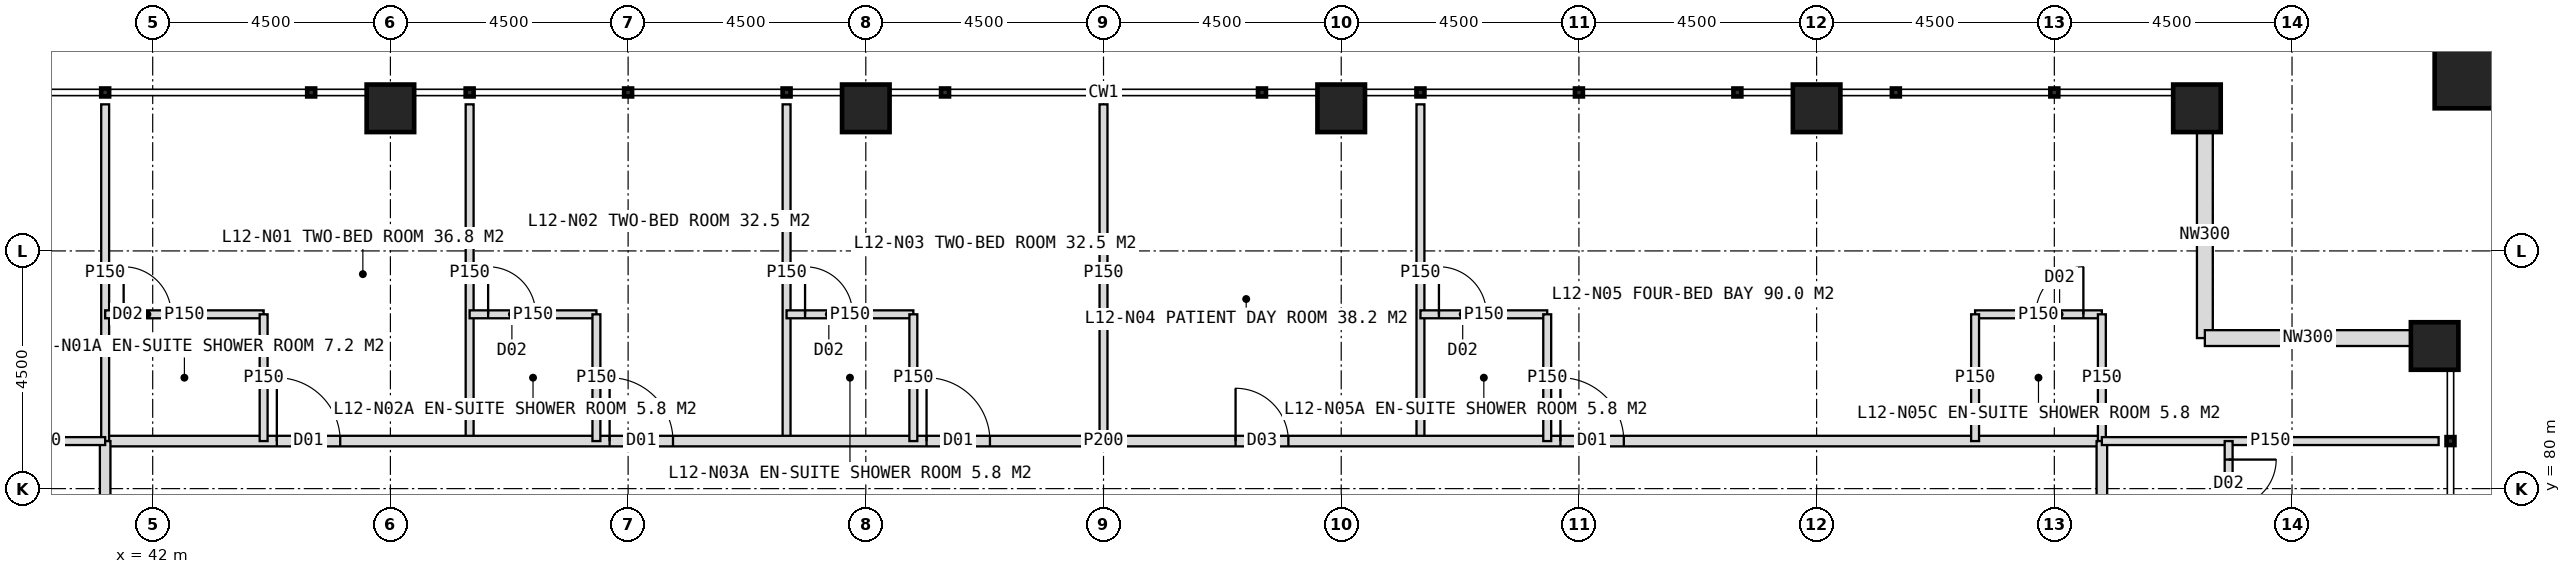
"""IFC4 building model, lengths in metres.
Left out: names, types, materials, properties, quantities, classifications, styles, units other than length and angle.
Written with IfcOpenShell. Run it as: python <this file> out.ifc"""

import sys

from ifc_helpers import new_model, si_unit, direction, frame, frame_2d, origin, origin_2d, place, context, subcontext, project, spatial, rectangle, hollow_rectangle, extrude, element, fill, save


model = new_model("IFC4")
c1 = context("Model", 3, precision=1e-05, world=origin(), true_north=direction((0.0, 1.0)))
c2 = subcontext(c1, "Body", "Model", "MODEL_VIEW")
j1 = project(units=[si_unit("LENGTHUNIT", "METRE"), si_unit("PLANEANGLEUNIT", "RADIAN")], contexts=[c1])
p1 = place(None, origin())
s1 = spatial("IfcSite", under=j1, at=p1, CompositionType="ELEMENT")
p2 = place(p1, origin())
s2 = spatial("IfcBuilding", under=s1, at=p2, CompositionType="ELEMENT")
p3 = place(p2, frame((0.0, 0.0, 55.0)))
s3 = spatial("IfcBuildingStorey", under=s2, at=p3, CompositionType="ELEMENT", Elevation=55.0)
for number, where, z_axis, x_axis in (
    (1, (46.5, 87.2, 0.0), (0.0, 0.0, 1.0), (1.0, 0.0, 0.0)),
    (2, (55.5, 87.2, 0.0), (0.0, 0.0, 1.0), (1.0, 0.0, 0.0)),
    (3, (64.5, 87.2, 0.0), (0.0, 0.0, 1.0), (1.0, 0.0, 0.0)),
    (4, (73.5, 87.2, 0.0), (0.0, 0.0, 1.0), (1.0, 0.0, 0.0)),
    (5, (80.7, 87.2, 0.0), (0.0, 0.0, 1.0), (1.0, 0.0, 0.0)),
    (6, (85.2, 82.7, 0.0), (0.0, 0.0, 1.0), (1.0, 0.0, 0.0)),
):
    element("IfcColumn", number, at=place(p3, frame(where, z_axis=z_axis, x_axis=x_axis)), inside=s3, PredefinedType="COLUMN", context=c2, shape_type="SweptSolid", body=[
        extrude(hollow_rectangle(XDim=0.9, YDim=0.9, WallThickness=0.08, at=origin_2d()), origin(), (0.0, 0.0, 1.0), 4.0),
    ])
p4 = place(p3, frame((86.1, 88.1, 0.0), z_axis=(0.0, 0.0, 1.0), x_axis=(1.0, 0.0, 0.0)))
e7 = element("IfcColumn", 7, at=p4, inside=s3, PredefinedType="COLUMN", context=c2, shape_type="SweptSolid", body=[
    extrude(hollow_rectangle(XDim=1.8, YDim=1.8, WallThickness=0.1, at=origin_2d()), origin(), (0.0, 0.0, 1.0), 4.0),
])
for number, where, z_axis, x_axis in (
    (8, (80.85, 86.75, 0.0), (0.0, 0.0, 1.0), (0.0, -1.0, 0.0)),
    (9, (80.85, 82.85, 0.0), (0.0, 0.0, 1.0), (1.0, 0.0, 0.0)),
):
    element("IfcWall", number, at=place(p3, frame(where, z_axis=z_axis, x_axis=x_axis)), inside=s3, PredefinedType="ELEMENTEDWALL", context=c2, shape_type="SweptSolid", body=[
        extrude(rectangle(XDim=3.9, YDim=0.3, at=frame_2d((1.95, 0.0))), origin(), (0.0, 0.0, 1.0), 2.95),
    ])
for number, where, z_axis, x_axis in (
    (10, (48.0, 80.9, 0.0), (0.0, 0.0, 1.0), (0.0, 1.0, 0.0)),
    (11, (54.0, 80.9, 0.0), (0.0, 0.0, 1.0), (0.0, 1.0, 0.0)),
):
    element("IfcWall", number, at=place(p3, frame(where, z_axis=z_axis, x_axis=x_axis)), inside=s3, PredefinedType="PARTITIONING", context=c2, shape_type="SweptSolid", body=[
        extrude(rectangle(XDim=6.375, YDim=0.15, at=frame_2d((3.188, 0.0))), origin(), (0.0, 0.0, 1.0), 3.75),
    ])
p5 = place(p3, frame((60.0, 80.9, 0.0), z_axis=(0.0, 0.0, 1.0), x_axis=(0.0, 1.0, 0.0)))
e12 = element("IfcWall", 12, at=p5, inside=s3, PredefinedType="PARTITIONING", context=c2, shape_type="SweptSolid", body=[
    extrude(rectangle(XDim=6.375, YDim=0.15, at=frame_2d((3.188, 0.0))), origin(), (0.0, 0.0, 1.0), 2.75),
])
p6 = place(p3, frame((66.0, 80.9, 0.0), z_axis=(0.0, 0.0, 1.0), x_axis=(0.0, 1.0, 0.0)))
e13 = element("IfcWall", 13, at=p6, inside=s3, PredefinedType="PARTITIONING", context=c2, shape_type="SweptSolid", body=[
    extrude(rectangle(XDim=6.375, YDim=0.15, at=frame_2d((3.188, 0.0))), origin(), (0.0, 0.0, 1.0), 3.75),
])
p7 = place(p3, frame((41.1, 80.9, 0.0), z_axis=(0.0, 0.0, 1.0), x_axis=(1.0, 0.0, 0.0)))
e14 = element("IfcWall", 14, at=p7, inside=s3, PredefinedType="PARTITIONING", context=c2, shape_type="SweptSolid", body=[
    extrude(rectangle(XDim=37.8, YDim=0.2, at=frame_2d((18.9, 0.0))), origin(), (0.0, 0.0, 1.0), 3.75),
])
p8 = place(p7, frame((3.25, 0.0, 0.0)))
e15 = element("IfcOpeningElement", 15, at=p8, cuts=e14, PredefinedType="OPENING", context=c2, shape_type="SweptSolid", body=[
    extrude(rectangle(XDim=1.2, YDim=2.2, at=frame_2d((0.6, 1.1))), frame((0.0, 0.11, 0.0), z_axis=(0.0, -1.0, 0.0), x_axis=(1.0, 0.0, 0.0)), (0.0, 0.0, 1.0), 0.22),
])
p9 = place(p7, frame((9.55, 0.0, 0.0)))
e16 = element("IfcOpeningElement", 16, at=p9, cuts=e14, PredefinedType="OPENING", context=c2, shape_type="SweptSolid", body=[
    extrude(rectangle(XDim=1.2, YDim=2.2, at=frame_2d((0.6, 1.1))), frame((0.0, 0.11, 0.0), z_axis=(0.0, -1.0, 0.0), x_axis=(1.0, 0.0, 0.0)), (0.0, 0.0, 1.0), 0.22),
])
p10 = place(p7, frame((15.55, 0.0, 0.0)))
e17 = element("IfcOpeningElement", 17, at=p10, cuts=e14, PredefinedType="OPENING", context=c2, shape_type="SweptSolid", body=[
    extrude(rectangle(XDim=1.2, YDim=2.2, at=frame_2d((0.6, 1.1))), frame((0.0, 0.11, 0.0), z_axis=(0.0, -1.0, 0.0), x_axis=(1.0, 0.0, 0.0)), (0.0, 0.0, 1.0), 0.22),
])
p11 = place(p7, frame((21.4, 0.0, 0.0)))
e18 = element("IfcOpeningElement", 18, at=p11, cuts=e14, PredefinedType="OPENING", context=c2, shape_type="SweptSolid", body=[
    extrude(rectangle(XDim=1.0, YDim=2.1, at=frame_2d((0.5, 1.05))), frame((0.0, 0.11, 0.0), z_axis=(0.0, -1.0, 0.0), x_axis=(1.0, 0.0, 0.0)), (0.0, 0.0, 1.0), 0.22),
])
p12 = place(p7, frame((27.55, 0.0, 0.0)))
e19 = element("IfcOpeningElement", 19, at=p12, cuts=e14, PredefinedType="OPENING", context=c2, shape_type="SweptSolid", body=[
    extrude(rectangle(XDim=1.2, YDim=2.2, at=frame_2d((0.6, 1.1))), frame((0.0, 0.11, 0.0), z_axis=(0.0, -1.0, 0.0), x_axis=(1.0, 0.0, 0.0)), (0.0, 0.0, 1.0), 0.22),
])
p13 = place(p3, frame((41.1, 80.9, 0.0), z_axis=(0.0, 0.0, 1.0), x_axis=(0.0, 1.0, 0.0)))
e20 = element("IfcWall", 20, at=p13, inside=s3, PredefinedType="PARTITIONING", context=c2, shape_type="SweptSolid", body=[
    extrude(rectangle(XDim=6.375, YDim=0.15, at=frame_2d((3.188, 0.0))), origin(), (0.0, 0.0, 1.0), 3.75),
])
p14 = place(p3, frame((41.1, 83.3, 0.0), z_axis=(0.0, 0.0, 1.0), x_axis=(1.0, 0.0, 0.0)))
e21 = element("IfcWall", 21, at=p14, inside=s3, PredefinedType="PARTITIONING", context=c2, shape_type="SweptSolid", body=[
    extrude(rectangle(XDim=3.0, YDim=0.15, at=frame_2d((1.5, 0.0))), origin(), (0.0, 0.0, 1.0), 3.75),
])
p15 = place(p14, frame((0.35, 0.0, 0.0)))
e22 = element("IfcOpeningElement", 22, at=p15, cuts=e21, PredefinedType="OPENING", context=c2, shape_type="SweptSolid", body=[
    extrude(rectangle(XDim=0.9, YDim=2.1, at=frame_2d((0.45, 1.05))), frame((0.0, 0.085, 0.0), z_axis=(0.0, -1.0, 0.0), x_axis=(1.0, 0.0, 0.0)), (0.0, 0.0, 1.0), 0.17),
])
p16 = place(p3, frame((44.1, 80.9, 0.0), z_axis=(0.0, 0.0, 1.0), x_axis=(0.0, 1.0, 0.0)))
e23 = element("IfcWall", 23, at=p16, inside=s3, PredefinedType="PARTITIONING", context=c2, shape_type="SweptSolid", body=[
    extrude(rectangle(XDim=2.4, YDim=0.15, at=frame_2d((1.2, 0.0))), origin(), (0.0, 0.0, 1.0), 3.75),
])
p17 = place(p3, frame((48.0, 83.3, 0.0), z_axis=(0.0, 0.0, 1.0), x_axis=(1.0, 0.0, 0.0)))
e24 = element("IfcWall", 24, at=p17, inside=s3, PredefinedType="PARTITIONING", context=c2, shape_type="SweptSolid", body=[
    extrude(rectangle(XDim=2.4, YDim=0.15, at=frame_2d((1.2, 0.0))), origin(), (0.0, 0.0, 1.0), 3.75),
])
p18 = place(p17, frame((0.35, 0.0, 0.0)))
e25 = element("IfcOpeningElement", 25, at=p18, cuts=e24, PredefinedType="OPENING", context=c2, shape_type="SweptSolid", body=[
    extrude(rectangle(XDim=0.9, YDim=2.1, at=frame_2d((0.45, 1.05))), frame((0.0, 0.085, 0.0), z_axis=(0.0, -1.0, 0.0), x_axis=(1.0, 0.0, 0.0)), (0.0, 0.0, 1.0), 0.17),
])
p19 = place(p3, frame((50.4, 80.9, 0.0), z_axis=(0.0, 0.0, 1.0), x_axis=(0.0, 1.0, 0.0)))
e26 = element("IfcWall", 26, at=p19, inside=s3, PredefinedType="PARTITIONING", context=c2, shape_type="SweptSolid", body=[
    extrude(rectangle(XDim=2.4, YDim=0.15, at=frame_2d((1.2, 0.0))), origin(), (0.0, 0.0, 1.0), 3.75),
])
p20 = place(p3, frame((54.0, 83.3, 0.0), z_axis=(0.0, 0.0, 1.0), x_axis=(1.0, 0.0, 0.0)))
e27 = element("IfcWall", 27, at=p20, inside=s3, PredefinedType="PARTITIONING", context=c2, shape_type="SweptSolid", body=[
    extrude(rectangle(XDim=2.4, YDim=0.15, at=frame_2d((1.2, 0.0))), origin(), (0.0, 0.0, 1.0), 3.75),
])
p21 = place(p20, frame((0.35, 0.0, 0.0)))
e28 = element("IfcOpeningElement", 28, at=p21, cuts=e27, PredefinedType="OPENING", context=c2, shape_type="SweptSolid", body=[
    extrude(rectangle(XDim=0.9, YDim=2.1, at=frame_2d((0.45, 1.05))), frame((0.0, 0.085, 0.0), z_axis=(0.0, -1.0, 0.0), x_axis=(1.0, 0.0, 0.0)), (0.0, 0.0, 1.0), 0.17),
])
p22 = place(p3, frame((56.4, 80.9, 0.0), z_axis=(0.0, 0.0, 1.0), x_axis=(0.0, 1.0, 0.0)))
e29 = element("IfcWall", 29, at=p22, inside=s3, PredefinedType="PARTITIONING", context=c2, shape_type="SweptSolid", body=[
    extrude(rectangle(XDim=2.4, YDim=0.15, at=frame_2d((1.2, 0.0))), origin(), (0.0, 0.0, 1.0), 3.75),
])
p23 = place(p3, frame((66.0, 83.3, 0.0), z_axis=(0.0, 0.0, 1.0), x_axis=(1.0, 0.0, 0.0)))
e30 = element("IfcWall", 30, at=p23, inside=s3, PredefinedType="PARTITIONING", context=c2, shape_type="SweptSolid", body=[
    extrude(rectangle(XDim=2.4, YDim=0.15, at=frame_2d((1.2, 0.0))), origin(), (0.0, 0.0, 1.0), 3.75),
])
p24 = place(p23, frame((0.35, 0.0, 0.0)))
e31 = element("IfcOpeningElement", 31, at=p24, cuts=e30, PredefinedType="OPENING", context=c2, shape_type="SweptSolid", body=[
    extrude(rectangle(XDim=0.9, YDim=2.1, at=frame_2d((0.45, 1.05))), frame((0.0, 0.085, 0.0), z_axis=(0.0, -1.0, 0.0), x_axis=(1.0, 0.0, 0.0)), (0.0, 0.0, 1.0), 0.17),
])
p25 = place(p3, frame((68.4, 80.9, 0.0), z_axis=(0.0, 0.0, 1.0), x_axis=(0.0, 1.0, 0.0)))
e32 = element("IfcWall", 32, at=p25, inside=s3, PredefinedType="PARTITIONING", context=c2, shape_type="SweptSolid", body=[
    extrude(rectangle(XDim=2.4, YDim=0.15, at=frame_2d((1.2, 0.0))), origin(), (0.0, 0.0, 1.0), 3.75),
])
p26 = place(p3, frame((76.5, 83.3, 0.0), z_axis=(0.0, 0.0, 1.0), x_axis=(1.0, 0.0, 0.0)))
e33 = element("IfcWall", 33, at=p26, inside=s3, PredefinedType="PARTITIONING", context=c2, shape_type="SweptSolid", body=[
    extrude(rectangle(XDim=2.4, YDim=0.15, at=frame_2d((1.2, 0.0))), origin(), (0.0, 0.0, 1.0), 3.75),
])
p27 = place(p26, frame((1.15, 0.0, 0.0)))
e34 = element("IfcOpeningElement", 34, at=p27, cuts=e33, PredefinedType="OPENING", context=c2, shape_type="SweptSolid", body=[
    extrude(rectangle(XDim=0.9, YDim=2.1, at=frame_2d((0.45, 1.05))), frame((0.0, 0.085, 0.0), z_axis=(0.0, -1.0, 0.0), x_axis=(1.0, 0.0, 0.0)), (0.0, 0.0, 1.0), 0.17),
])
for number, where, z_axis, x_axis in (
    (35, (76.5, 80.9, 0.0), (0.0, 0.0, 1.0), (0.0, 1.0, 0.0)),
    (36, (78.9, 80.9, 0.0), (0.0, 0.0, 1.0), (0.0, 1.0, 0.0)),
):
    element("IfcWall", number, at=place(p3, frame(where, z_axis=z_axis, x_axis=x_axis)), inside=s3, PredefinedType="PARTITIONING", context=c2, shape_type="SweptSolid", body=[
        extrude(rectangle(XDim=2.4, YDim=0.15, at=frame_2d((1.2, 0.0))), origin(), (0.0, 0.0, 1.0), 3.75),
    ])
p28 = place(p3, frame((41.1, 43.1, 0.0), z_axis=(0.0, 0.0, 1.0), x_axis=(0.0, 1.0, 0.0)))
e37 = element("IfcWall", 37, at=p28, inside=s3, PredefinedType="PARTITIONING", context=c2, shape_type="SweptSolid", body=[
    extrude(rectangle(XDim=37.8, YDim=0.2, at=frame_2d((18.9, 0.0))), origin(), (0.0, 0.0, 1.0), 3.75),
])
p29 = place(p28, frame((3.25, 0.0, 0.0)))
e38 = element("IfcOpeningElement", 38, at=p29, cuts=e37, PredefinedType="OPENING", context=c2, shape_type="SweptSolid", body=[
    extrude(rectangle(XDim=1.2, YDim=2.2, at=frame_2d((0.6, 1.1))), frame((0.0, 0.11, 0.0), z_axis=(0.0, -1.0, 0.0), x_axis=(1.0, 0.0, 0.0)), (0.0, 0.0, 1.0), 0.22),
])
p30 = place(p28, frame((9.55, 0.0, 0.0)))
e39 = element("IfcOpeningElement", 39, at=p30, cuts=e37, PredefinedType="OPENING", context=c2, shape_type="SweptSolid", body=[
    extrude(rectangle(XDim=1.2, YDim=2.2, at=frame_2d((0.6, 1.1))), frame((0.0, 0.11, 0.0), z_axis=(0.0, -1.0, 0.0), x_axis=(1.0, 0.0, 0.0)), (0.0, 0.0, 1.0), 0.22),
])
p31 = place(p28, frame((15.55, 0.0, 0.0)))
e40 = element("IfcOpeningElement", 40, at=p31, cuts=e37, PredefinedType="OPENING", context=c2, shape_type="SweptSolid", body=[
    extrude(rectangle(XDim=1.2, YDim=2.2, at=frame_2d((0.6, 1.1))), frame((0.0, 0.11, 0.0), z_axis=(0.0, -1.0, 0.0), x_axis=(1.0, 0.0, 0.0)), (0.0, 0.0, 1.0), 0.22),
])
p32 = place(p28, frame((21.55, 0.0, 0.0)))
e41 = element("IfcOpeningElement", 41, at=p32, cuts=e37, PredefinedType="OPENING", context=c2, shape_type="SweptSolid", body=[
    extrude(rectangle(XDim=1.2, YDim=2.2, at=frame_2d((0.6, 1.1))), frame((0.0, 0.11, 0.0), z_axis=(0.0, -1.0, 0.0), x_axis=(1.0, 0.0, 0.0)), (0.0, 0.0, 1.0), 0.22),
])
p33 = place(p28, frame((27.55, 0.0, 0.0)))
e42 = element("IfcOpeningElement", 42, at=p33, cuts=e37, PredefinedType="OPENING", context=c2, shape_type="SweptSolid", body=[
    extrude(rectangle(XDim=1.2, YDim=2.2, at=frame_2d((0.6, 1.1))), frame((0.0, 0.11, 0.0), z_axis=(0.0, -1.0, 0.0), x_axis=(1.0, 0.0, 0.0)), (0.0, 0.0, 1.0), 0.22),
])
p34 = place(p3, frame((41.1, 80.9, 0.0), z_axis=(0.0, 0.0, 1.0), x_axis=(-1.0, 0.0, 0.0)))
e43 = element("IfcWall", 43, at=p34, inside=s3, PredefinedType="PARTITIONING", context=c2, shape_type="SweptSolid", body=[
    extrude(rectangle(XDim=2.4, YDim=0.15, at=frame_2d((1.2, 0.0))), origin(), (0.0, 0.0, 1.0), 3.75),
])
p35 = place(p3, frame((78.9, 80.9, 0.0), z_axis=(0.0, 0.0, 1.0), x_axis=(0.0, -1.0, 0.0)))
e44 = element("IfcWall", 44, at=p35, inside=s3, PredefinedType="PARTITIONING", context=c2, shape_type="SweptSolid", body=[
    extrude(rectangle(XDim=37.8, YDim=0.2, at=frame_2d((18.9, 0.0))), origin(), (0.0, 0.0, 1.0), 3.75),
])
p36 = place(p35, frame((3.25, 0.0, 0.0)))
e45 = element("IfcOpeningElement", 45, at=p36, cuts=e44, PredefinedType="OPENING", context=c2, shape_type="SweptSolid", body=[
    extrude(rectangle(XDim=1.2, YDim=2.2, at=frame_2d((0.6, 1.1))), frame((0.0, 0.11, 0.0), z_axis=(0.0, -1.0, 0.0), x_axis=(1.0, 0.0, 0.0)), (0.0, 0.0, 1.0), 0.22),
])
p37 = place(p35, frame((9.55, 0.0, 0.0)))
e46 = element("IfcOpeningElement", 46, at=p37, cuts=e44, PredefinedType="OPENING", context=c2, shape_type="SweptSolid", body=[
    extrude(rectangle(XDim=1.2, YDim=2.2, at=frame_2d((0.6, 1.1))), frame((0.0, 0.11, 0.0), z_axis=(0.0, -1.0, 0.0), x_axis=(1.0, 0.0, 0.0)), (0.0, 0.0, 1.0), 0.22),
])
p38 = place(p35, frame((15.55, 0.0, 0.0)))
e47 = element("IfcOpeningElement", 47, at=p38, cuts=e44, PredefinedType="OPENING", context=c2, shape_type="SweptSolid", body=[
    extrude(rectangle(XDim=1.2, YDim=2.2, at=frame_2d((0.6, 1.1))), frame((0.0, 0.11, 0.0), z_axis=(0.0, -1.0, 0.0), x_axis=(1.0, 0.0, 0.0)), (0.0, 0.0, 1.0), 0.22),
])
p39 = place(p35, frame((21.55, 0.0, 0.0)))
e48 = element("IfcOpeningElement", 48, at=p39, cuts=e44, PredefinedType="OPENING", context=c2, shape_type="SweptSolid", body=[
    extrude(rectangle(XDim=1.2, YDim=2.2, at=frame_2d((0.6, 1.1))), frame((0.0, 0.11, 0.0), z_axis=(0.0, -1.0, 0.0), x_axis=(1.0, 0.0, 0.0)), (0.0, 0.0, 1.0), 0.22),
])
p40 = place(p35, frame((30.55, 0.0, 0.0)))
e49 = element("IfcOpeningElement", 49, at=p40, cuts=e44, PredefinedType="OPENING", context=c2, shape_type="SweptSolid", body=[
    extrude(rectangle(XDim=1.2, YDim=2.2, at=frame_2d((0.6, 1.1))), frame((0.0, 0.11, 0.0), z_axis=(0.0, -1.0, 0.0), x_axis=(1.0, 0.0, 0.0)), (0.0, 0.0, 1.0), 0.22),
])
p41 = place(p3, frame((78.9, 80.9, 0.0), z_axis=(0.0, 0.0, 1.0), x_axis=(1.0, 0.0, 0.0)))
e50 = element("IfcWall", 50, at=p41, inside=s3, PredefinedType="PARTITIONING", context=c2, shape_type="SweptSolid", body=[
    extrude(rectangle(XDim=6.375, YDim=0.15, at=frame_2d((3.188, 0.0))), origin(), (0.0, 0.0, 1.0), 3.75),
])
p42 = place(p3, frame((81.3, 80.9, 0.0), z_axis=(0.0, 0.0, 1.0), x_axis=(0.0, -1.0, 0.0)))
e51 = element("IfcWall", 51, at=p42, inside=s3, PredefinedType="PARTITIONING", context=c2, shape_type="SweptSolid", body=[
    extrude(rectangle(XDim=3.0, YDim=0.15, at=frame_2d((1.5, 0.0))), origin(), (0.0, 0.0, 1.0), 3.75),
])
p43 = place(p42, frame((0.35, 0.0, 0.0)))
e52 = element("IfcOpeningElement", 52, at=p43, cuts=e51, PredefinedType="OPENING", context=c2, shape_type="SweptSolid", body=[
    extrude(rectangle(XDim=0.9, YDim=2.1, at=frame_2d((0.45, 1.05))), frame((0.0, 0.085, 0.0), z_axis=(0.0, -1.0, 0.0), x_axis=(1.0, 0.0, 0.0)), (0.0, 0.0, 1.0), 0.17),
])
p44 = place(p8, origin())
e53 = element("IfcDoor", 53, at=p44, inside=s3, OperationType="SINGLE_SWING_LEFT", PredefinedType="DOOR", context=c2, shape_type="SweptSolid", body=[
    extrude(rectangle(XDim=1.2, YDim=2.2, at=frame_2d((0.6, 1.1))), frame((0.0, 0.025, 0.0), z_axis=(0.0, -1.0, 0.0), x_axis=(1.0, 0.0, 0.0)), (0.0, 0.0, 1.0), 0.05),
])
fill(e15, e53)
p45 = place(p15, origin())
e54 = element("IfcDoor", 54, at=p45, inside=s3, OperationType="SINGLE_SWING_LEFT", PredefinedType="DOOR", context=c2, shape_type="SweptSolid", body=[
    extrude(rectangle(XDim=0.9, YDim=2.1, at=frame_2d((0.45, 1.05))), frame((0.0, 0.025, 0.0), z_axis=(0.0, -1.0, 0.0), x_axis=(1.0, 0.0, 0.0)), (0.0, 0.0, 1.0), 0.05),
])
fill(e22, e54)
p46 = place(p9, origin())
e55 = element("IfcDoor", 55, at=p46, inside=s3, OperationType="SINGLE_SWING_LEFT", PredefinedType="DOOR", context=c2, shape_type="SweptSolid", body=[
    extrude(rectangle(XDim=1.2, YDim=2.2, at=frame_2d((0.6, 1.1))), frame((0.0, 0.025, 0.0), z_axis=(0.0, -1.0, 0.0), x_axis=(1.0, 0.0, 0.0)), (0.0, 0.0, 1.0), 0.05),
])
fill(e16, e55)
p47 = place(p18, origin())
e56 = element("IfcDoor", 56, at=p47, inside=s3, OperationType="SINGLE_SWING_LEFT", PredefinedType="DOOR", context=c2, shape_type="SweptSolid", body=[
    extrude(rectangle(XDim=0.9, YDim=2.1, at=frame_2d((0.45, 1.05))), frame((0.0, 0.025, 0.0), z_axis=(0.0, -1.0, 0.0), x_axis=(1.0, 0.0, 0.0)), (0.0, 0.0, 1.0), 0.05),
])
fill(e25, e56)
p48 = place(p10, origin())
e57 = element("IfcDoor", 57, at=p48, inside=s3, OperationType="SINGLE_SWING_LEFT", PredefinedType="DOOR", context=c2, shape_type="SweptSolid", body=[
    extrude(rectangle(XDim=1.2, YDim=2.2, at=frame_2d((0.6, 1.1))), frame((0.0, 0.025, 0.0), z_axis=(0.0, -1.0, 0.0), x_axis=(1.0, 0.0, 0.0)), (0.0, 0.0, 1.0), 0.05),
])
fill(e17, e57)
p49 = place(p21, origin())
e58 = element("IfcDoor", 58, at=p49, inside=s3, OperationType="SINGLE_SWING_LEFT", PredefinedType="DOOR", context=c2, shape_type="SweptSolid", body=[
    extrude(rectangle(XDim=0.9, YDim=2.1, at=frame_2d((0.45, 1.05))), frame((0.0, 0.025, 0.0), z_axis=(0.0, -1.0, 0.0), x_axis=(1.0, 0.0, 0.0)), (0.0, 0.0, 1.0), 0.05),
])
fill(e28, e58)
p50 = place(p11, origin())
e59 = element("IfcDoor", 59, at=p50, inside=s3, OperationType="SINGLE_SWING_LEFT", PredefinedType="DOOR", context=c2, shape_type="SweptSolid", body=[
    extrude(rectangle(XDim=1.0, YDim=2.1, at=frame_2d((0.5, 1.05))), frame((0.0, 0.025, 0.0), z_axis=(0.0, -1.0, 0.0), x_axis=(1.0, 0.0, 0.0)), (0.0, 0.0, 1.0), 0.05),
])
fill(e18, e59)
p51 = place(p12, origin())
e60 = element("IfcDoor", 60, at=p51, inside=s3, OperationType="SINGLE_SWING_LEFT", PredefinedType="DOOR", context=c2, shape_type="SweptSolid", body=[
    extrude(rectangle(XDim=1.2, YDim=2.2, at=frame_2d((0.6, 1.1))), frame((0.0, 0.025, 0.0), z_axis=(0.0, -1.0, 0.0), x_axis=(1.0, 0.0, 0.0)), (0.0, 0.0, 1.0), 0.05),
])
fill(e19, e60)
p52 = place(p24, origin())
e61 = element("IfcDoor", 61, at=p52, inside=s3, OperationType="SINGLE_SWING_LEFT", PredefinedType="DOOR", context=c2, shape_type="SweptSolid", body=[
    extrude(rectangle(XDim=0.9, YDim=2.1, at=frame_2d((0.45, 1.05))), frame((0.0, 0.025, 0.0), z_axis=(0.0, -1.0, 0.0), x_axis=(1.0, 0.0, 0.0)), (0.0, 0.0, 1.0), 0.05),
])
fill(e31, e61)
p53 = place(p27, origin())
e62 = element("IfcDoor", 62, at=p53, inside=s3, OperationType="SINGLE_SWING_RIGHT", PredefinedType="DOOR", context=c2, shape_type="SweptSolid", body=[
    extrude(rectangle(XDim=0.9, YDim=2.1, at=frame_2d((0.45, 1.05))), frame((0.0, 0.025, 0.0), z_axis=(0.0, -1.0, 0.0), x_axis=(1.0, 0.0, 0.0)), (0.0, 0.0, 1.0), 0.05),
])
fill(e34, e62)
p54 = place(p43, origin())
e63 = element("IfcDoor", 63, at=p54, inside=s3, OperationType="SINGLE_SWING_LEFT", PredefinedType="DOOR", context=c2, shape_type="SweptSolid", body=[
    extrude(rectangle(XDim=0.9, YDim=2.1, at=frame_2d((0.45, 1.05))), frame((0.0, 0.025, 0.0), z_axis=(0.0, -1.0, 0.0), x_axis=(1.0, 0.0, 0.0)), (0.0, 0.0, 1.0), 0.05),
])
fill(e52, e63)
save(model, sys.argv[1])
